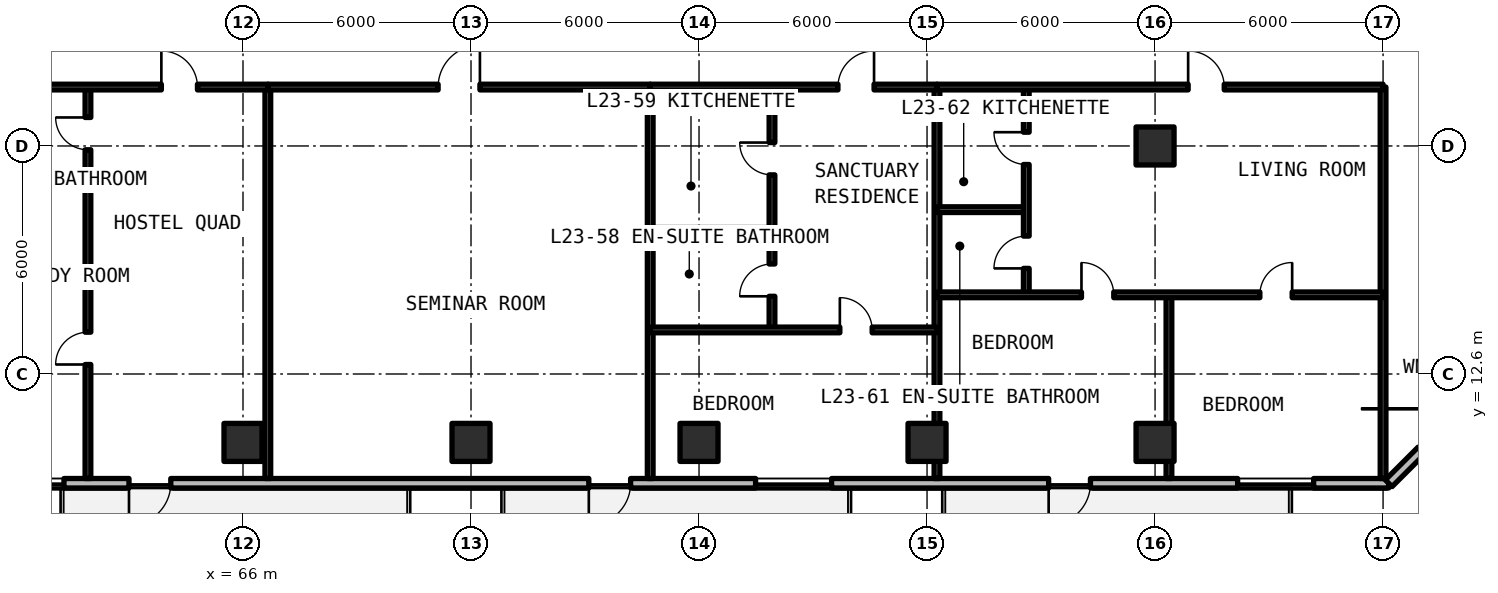
"""IFC4 building model, lengths in metres.
Left out: names, types, materials, properties, quantities, classifications, styles, units other than length and angle.
Written with IfcOpenShell. Run it as: python <this file> out.ifc"""

import sys

from ifc_helpers import new_model, si_unit, direction, frame, frame_2d, origin, origin_2d, place, context, subcontext, project, spatial, rectangle, extrude, element, fill, save


model = new_model("IFC4")
c1 = context("Model", 3, precision=1e-05, world=origin(), true_north=direction((0.0, 1.0)))
c2 = subcontext(c1, "Body", "Model", "MODEL_VIEW")
j1 = project(units=[si_unit("LENGTHUNIT", "METRE"), si_unit("PLANEANGLEUNIT", "RADIAN")], contexts=[c1])
p1 = place(None, origin())
s1 = spatial("IfcSite", under=j1, at=p1, CompositionType="ELEMENT")
p2 = place(p1, origin())
s2 = spatial("IfcBuilding", under=s1, at=p2, CompositionType="ELEMENT")
p3 = place(p2, frame((0.0, 0.0, 85.47)))
s3 = spatial("IfcBuildingStorey", under=s2, at=p3, CompositionType="ELEMENT", Elevation=85.47)
for number, where, z_axis, x_axis in (
    (1, (90.0, 18.6, 0.0), (0.0, 0.0, 1.0), (1.0, 0.0, 0.0)),
    (2, (66.0, 10.8, 0.0), (0.0, 0.0, 1.0), (1.0, 0.0, 0.0)),
    (3, (72.0, 10.8, 0.0), (0.0, 0.0, 1.0), (1.0, 0.0, 0.0)),
    (4, (78.0, 10.8, 0.0), (0.0, 0.0, 1.0), (1.0, 0.0, 0.0)),
    (5, (84.0, 10.8, 0.0), (0.0, 0.0, 1.0), (1.0, 0.0, 0.0)),
    (6, (90.0, 10.8, 0.0), (0.0, 0.0, 1.0), (1.0, 0.0, 0.0)),
):
    element("IfcColumn", number, at=place(p3, frame(where, z_axis=z_axis, x_axis=x_axis)), inside=s3, PredefinedType="COLUMN", context=c2, shape_type="SweptSolid", body=[
        extrude(rectangle(XDim=1.0, YDim=1.0, at=origin_2d()), origin(), (0.0, 0.0, 1.0), 3.3),
    ])
p4 = place(p3, frame((52.125, 9.725, 0.0), z_axis=(0.0, 0.0, 1.0), x_axis=(1.0, 0.0, 0.0)))
e7 = element("IfcWall", 7, at=p4, inside=s3, PredefinedType="SOLIDWALL", context=c2, shape_type="SweptSolid", body=[
    extrude(rectangle(XDim=44.023, YDim=0.25, at=frame_2d((22.012, 0.0))), origin(), (0.0, 0.0, 1.0), 3.08),
])
p5 = place(p4, frame((10.875, 0.0, 0.0)))
e8 = element("IfcOpeningElement", 8, at=p5, cuts=e7, PredefinedType="OPENING", context=c2, shape_type="SweptSolid", body=[
    extrude(rectangle(XDim=1.1, YDim=2.15, at=frame_2d((0.55, 1.075))), frame((0.0, 0.135, 0.0), z_axis=(0.0, -1.0, 0.0), x_axis=(1.0, 0.0, 0.0)), (0.0, 0.0, 1.0), 0.27),
])
p6 = place(p4, frame((22.975, 0.0, 0.0)))
e9 = element("IfcOpeningElement", 9, at=p6, cuts=e7, PredefinedType="OPENING", context=c2, shape_type="SweptSolid", body=[
    extrude(rectangle(XDim=1.1, YDim=2.15, at=frame_2d((0.55, 1.075))), frame((0.0, 0.135, 0.0), z_axis=(0.0, -1.0, 0.0), x_axis=(1.0, 0.0, 0.0)), (0.0, 0.0, 1.0), 0.27),
])
p7 = place(p4, frame((35.075, 0.0, 0.0)))
e10 = element("IfcOpeningElement", 10, at=p7, cuts=e7, PredefinedType="OPENING", context=c2, shape_type="SweptSolid", body=[
    extrude(rectangle(XDim=1.1, YDim=2.15, at=frame_2d((0.55, 1.075))), frame((0.0, 0.135, 0.0), z_axis=(0.0, -1.0, 0.0), x_axis=(1.0, 0.0, 0.0)), (0.0, 0.0, 1.0), 0.27),
])
p8 = place(p4, frame((2.669, 0.0, 0.78)))
e11 = element("IfcOpeningElement", 11, at=p8, cuts=e7, PredefinedType="OPENING", context=c2, shape_type="SweptSolid", body=[
    extrude(rectangle(XDim=2.0, YDim=1.66, at=frame_2d((1.0, 0.83))), frame((0.0, 0.135, 0.0), z_axis=(0.0, -1.0, 0.0), x_axis=(1.0, 0.0, 0.0)), (0.0, 0.0, 1.0), 0.27),
])
p9 = place(p4, frame((8.314, 0.0, 0.78)))
e12 = element("IfcOpeningElement", 12, at=p9, cuts=e7, PredefinedType="OPENING", context=c2, shape_type="SweptSolid", body=[
    extrude(rectangle(XDim=0.85, YDim=1.65, at=frame_2d((0.425, 0.825))), frame((0.0, 0.135, 0.0), z_axis=(0.0, -1.0, 0.0), x_axis=(1.0, 0.0, 0.0)), (0.0, 0.0, 1.0), 0.27),
])
p10 = place(p4, frame((27.363, 0.0, 0.78)))
e13 = element("IfcOpeningElement", 13, at=p10, cuts=e7, PredefinedType="OPENING", context=c2, shape_type="SweptSolid", body=[
    extrude(rectangle(XDim=2.0, YDim=1.66, at=frame_2d((1.0, 0.83))), frame((0.0, 0.135, 0.0), z_axis=(0.0, -1.0, 0.0), x_axis=(1.0, 0.0, 0.0)), (0.0, 0.0, 1.0), 0.27),
])
p11 = place(p4, frame((40.048, 0.0, 0.78)))
e14 = element("IfcOpeningElement", 14, at=p11, cuts=e7, PredefinedType="OPENING", context=c2, shape_type="SweptSolid", body=[
    extrude(rectangle(XDim=2.0, YDim=1.66, at=frame_2d((1.0, 0.83))), frame((0.0, 0.135, 0.0), z_axis=(0.0, -1.0, 0.0), x_axis=(1.0, 0.0, 0.0)), (0.0, 0.0, 1.0), 0.27),
])
p12 = place(p3, frame((96.148, 9.725, 0.0), z_axis=(0.0, 0.0, 1.0), x_axis=(0.707106781187, 0.707106781187, 0.0)))
e15 = element("IfcWall", 15, at=p12, inside=s3, PredefinedType="SOLIDWALL", context=c2, shape_type="SweptSolid", body=[
    extrude(rectangle(XDim=5.836, YDim=0.25, at=frame_2d((2.918, 0.0))), origin(), (0.0, 0.0, 1.0), 3.08),
])
p13 = place(p12, frame((1.218, 0.0, 0.78)))
e16 = element("IfcOpeningElement", 16, at=p13, cuts=e15, PredefinedType="OPENING", context=c2, shape_type="SweptSolid", body=[
    extrude(rectangle(XDim=3.4, YDim=1.66, at=frame_2d((1.7, 0.83))), frame((0.0, 0.135, 0.0), z_axis=(0.0, -1.0, 0.0), x_axis=(1.0, 0.0, 0.0)), (0.0, 0.0, 1.0), 0.27),
])
for number, where, z_axis, x_axis in (
    (17, (96.0, 9.85, 0.0), (0.0, 0.0, 1.0), (0.0, 1.0, 0.0)),
    (18, (66.654, 9.85, 0.0), (0.0, 0.0, 1.0), (0.0, 1.0, 0.0)),
):
    element("IfcWall", number, at=place(p3, frame(where, z_axis=z_axis, x_axis=x_axis)), inside=s3, PredefinedType="SOLIDWALL", context=c2, shape_type="SweptSolid", body=[
        extrude(rectangle(XDim=10.3, YDim=0.15, at=frame_2d((5.15, 0.0))), origin(), (0.0, 0.0, 1.0), 2.35),
    ])
p14 = place(p3, frame((58.828, 17.7, 0.0), z_axis=(0.0, 0.0, 1.0), x_axis=(1.0, 0.0, 0.0)))
e19 = element("IfcWall", 19, at=p14, inside=s3, PredefinedType="PARTITIONING", context=c2, shape_type="SweptSolid", body=[
    extrude(rectangle(XDim=3.092, YDim=0.15, at=frame_2d((1.546, 0.0))), origin(), (0.0, 0.0, 1.0), 2.35),
])
p15 = place(p3, frame((61.92, 9.85, 0.0), z_axis=(0.0, 0.0, 1.0), x_axis=(0.0, 1.0, 0.0)))
e20 = element("IfcWall", 20, at=p15, inside=s3, PredefinedType="PARTITIONING", context=c2, shape_type="SweptSolid", body=[
    extrude(rectangle(XDim=10.3, YDim=0.15, at=frame_2d((5.15, 0.0))), origin(), (0.0, 0.0, 1.0), 2.35),
])
p16 = place(p15, frame((3.0, 0.0, 0.0)))
e21 = element("IfcOpeningElement", 21, at=p16, cuts=e20, PredefinedType="OPENING", context=c2, shape_type="SweptSolid", body=[
    extrude(rectangle(XDim=0.85, YDim=2.1, at=frame_2d((0.425, 1.05))), frame((0.0, 0.085, 0.0), z_axis=(0.0, -1.0, 0.0), x_axis=(1.0, 0.0, 0.0)), (0.0, 0.0, 1.0), 0.17),
])
p17 = place(p15, frame((8.65, 0.0, 0.0)))
e22 = element("IfcOpeningElement", 22, at=p17, cuts=e20, PredefinedType="OPENING", context=c2, shape_type="SweptSolid", body=[
    extrude(rectangle(XDim=0.85, YDim=2.1, at=frame_2d((0.425, 1.05))), frame((0.0, 0.085, 0.0), z_axis=(0.0, -1.0, 0.0), x_axis=(1.0, 0.0, 0.0)), (0.0, 0.0, 1.0), 0.17),
])
p18 = place(p3, frame((58.828, 20.15, 0.0), z_axis=(0.0, 0.0, 1.0), x_axis=(1.0, 0.0, 0.0)))
e23 = element("IfcWall", 23, at=p18, inside=s3, PredefinedType="SOLIDWALL", context=c2, shape_type="SweptSolid", body=[
    extrude(rectangle(XDim=7.826, YDim=0.15, at=frame_2d((3.913, 0.0))), origin(), (0.0, 0.0, 1.0), 2.35),
])
p19 = place(p18, frame((5.024, 0.0, 0.0)))
e24 = element("IfcOpeningElement", 24, at=p19, cuts=e23, PredefinedType="OPENING", context=c2, shape_type="SweptSolid", body=[
    extrude(rectangle(XDim=0.95, YDim=2.15, at=frame_2d((0.475, 1.075))), frame((0.0, 0.085, 0.0), z_axis=(0.0, -1.0, 0.0), x_axis=(1.0, 0.0, 0.0)), (0.0, 0.0, 1.0), 0.17),
])
p20 = place(p3, frame((76.715, 9.85, 0.0), z_axis=(0.0, 0.0, 1.0), x_axis=(0.0, 1.0, 0.0)))
e25 = element("IfcWall", 25, at=p20, inside=s3, PredefinedType="SOLIDWALL", context=c2, shape_type="SweptSolid", body=[
    extrude(rectangle(XDim=10.3, YDim=0.15, at=frame_2d((5.15, 0.0))), origin(), (0.0, 0.0, 1.0), 2.35),
])
p21 = place(p3, frame((66.654, 20.15, 0.0), z_axis=(0.0, 0.0, 1.0), x_axis=(1.0, 0.0, 0.0)))
e26 = element("IfcWall", 26, at=p21, inside=s3, PredefinedType="SOLIDWALL", context=c2, shape_type="SweptSolid", body=[
    extrude(rectangle(XDim=10.062, YDim=0.15, at=frame_2d((5.031, 0.0))), origin(), (0.0, 0.0, 1.0), 2.35),
])
p22 = place(p21, frame((4.481, 0.0, 0.0)))
e27 = element("IfcOpeningElement", 27, at=p22, cuts=e26, PredefinedType="OPENING", context=c2, shape_type="SweptSolid", body=[
    extrude(rectangle(XDim=1.1, YDim=2.15, at=frame_2d((0.55, 1.075))), frame((0.0, 0.085, 0.0), z_axis=(0.0, -1.0, 0.0), x_axis=(1.0, 0.0, 0.0)), (0.0, 0.0, 1.0), 0.17),
])
p23 = place(p3, frame((84.261, 9.85, 0.0), z_axis=(0.0, 0.0, 1.0), x_axis=(0.0, 1.0, 0.0)))
e28 = element("IfcWall", 28, at=p23, inside=s3, PredefinedType="SOLIDWALL", context=c2, shape_type="SweptSolid", body=[
    extrude(rectangle(XDim=10.3, YDim=0.15, at=frame_2d((5.15, 0.0))), origin(), (0.0, 0.0, 1.0), 2.35),
])
p24 = place(p3, frame((76.715, 16.379, 0.0), z_axis=(0.0, 0.0, 1.0), x_axis=(1.0, 0.0, 0.0)))
e29 = element("IfcWall", 29, at=p24, inside=s3, PredefinedType="PARTITIONING", context=c2, shape_type="SweptSolid", body=[
    extrude(rectangle(XDim=3.205, YDim=0.15, at=frame_2d((1.603, 0.0))), origin(), (0.0, 0.0, 1.0), 2.35),
])
p25 = place(p3, frame((79.92, 13.759, 0.0), z_axis=(0.0, 0.0, 1.0), x_axis=(0.0, 1.0, 0.0)))
e30 = element("IfcWall", 30, at=p25, inside=s3, PredefinedType="PARTITIONING", context=c2, shape_type="SweptSolid", body=[
    extrude(rectangle(XDim=6.391, YDim=0.15, at=frame_2d((3.195, 0.0))), origin(), (0.0, 0.0, 1.0), 2.35),
])
p26 = place(p25, frame((0.885, 0.0, 0.0)))
e31 = element("IfcOpeningElement", 31, at=p26, cuts=e30, PredefinedType="OPENING", context=c2, shape_type="SweptSolid", body=[
    extrude(rectangle(XDim=0.85, YDim=2.1, at=frame_2d((0.425, 1.05))), frame((0.0, 0.085, 0.0), z_axis=(0.0, -1.0, 0.0), x_axis=(1.0, 0.0, 0.0)), (0.0, 0.0, 1.0), 0.17),
])
p27 = place(p25, frame((4.08, 0.0, 0.0)))
e32 = element("IfcOpeningElement", 32, at=p27, cuts=e30, PredefinedType="OPENING", context=c2, shape_type="SweptSolid", body=[
    extrude(rectangle(XDim=0.85, YDim=2.1, at=frame_2d((0.425, 1.05))), frame((0.0, 0.085, 0.0), z_axis=(0.0, -1.0, 0.0), x_axis=(1.0, 0.0, 0.0)), (0.0, 0.0, 1.0), 0.17),
])
p28 = place(p3, frame((76.715, 13.759, 0.0), z_axis=(0.0, 0.0, 1.0), x_axis=(1.0, 0.0, 0.0)))
e33 = element("IfcWall", 33, at=p28, inside=s3, PredefinedType="PARTITIONING", context=c2, shape_type="SweptSolid", body=[
    extrude(rectangle(XDim=7.546, YDim=0.15, at=frame_2d((3.773, 0.0))), origin(), (0.0, 0.0, 1.0), 2.35),
])
p29 = place(p28, frame((4.99, 0.0, 0.0)))
e34 = element("IfcOpeningElement", 34, at=p29, cuts=e33, PredefinedType="OPENING", context=c2, shape_type="SweptSolid", body=[
    extrude(rectangle(XDim=0.85, YDim=2.1, at=frame_2d((0.425, 1.05))), frame((0.0, 0.085, 0.0), z_axis=(0.0, -1.0, 0.0), x_axis=(1.0, 0.0, 0.0)), (0.0, 0.0, 1.0), 0.17),
])
p30 = place(p3, frame((76.715, 20.15, 0.0), z_axis=(0.0, 0.0, 1.0), x_axis=(1.0, 0.0, 0.0)))
e35 = element("IfcWall", 35, at=p30, inside=s3, PredefinedType="SOLIDWALL", context=c2, shape_type="SweptSolid", body=[
    extrude(rectangle(XDim=7.546, YDim=0.15, at=frame_2d((3.773, 0.0))), origin(), (0.0, 0.0, 1.0), 2.35),
])
p31 = place(p30, frame((4.94, 0.0, 0.0)))
e36 = element("IfcOpeningElement", 36, at=p31, cuts=e35, PredefinedType="OPENING", context=c2, shape_type="SweptSolid", body=[
    extrude(rectangle(XDim=0.95, YDim=2.15, at=frame_2d((0.475, 1.075))), frame((0.0, 0.085, 0.0), z_axis=(0.0, -1.0, 0.0), x_axis=(1.0, 0.0, 0.0)), (0.0, 0.0, 1.0), 0.17),
])
p32 = place(p3, frame((84.261, 16.924, 0.0), z_axis=(0.0, 0.0, 1.0), x_axis=(1.0, 0.0, 0.0)))
e37 = element("IfcWall", 37, at=p32, inside=s3, PredefinedType="PARTITIONING", context=c2, shape_type="SweptSolid", body=[
    extrude(rectangle(XDim=2.35, YDim=0.15, at=frame_2d((1.175, 0.0))), origin(), (0.0, 0.0, 1.0), 2.35),
])
p33 = place(p3, frame((86.611, 14.683, 0.0), z_axis=(0.0, 0.0, 1.0), x_axis=(0.0, 1.0, 0.0)))
e38 = element("IfcWall", 38, at=p33, inside=s3, PredefinedType="PARTITIONING", context=c2, shape_type="SweptSolid", body=[
    extrude(rectangle(XDim=5.467, YDim=0.15, at=frame_2d((2.733, 0.0))), origin(), (0.0, 0.0, 1.0), 2.35),
])
p34 = place(p33, frame((0.696, 0.0, 0.0)))
e39 = element("IfcOpeningElement", 39, at=p34, cuts=e38, PredefinedType="OPENING", context=c2, shape_type="SweptSolid", body=[
    extrude(rectangle(XDim=0.85, YDim=2.1, at=frame_2d((0.425, 1.05))), frame((0.0, 0.085, 0.0), z_axis=(0.0, -1.0, 0.0), x_axis=(1.0, 0.0, 0.0)), (0.0, 0.0, 1.0), 0.17),
])
p35 = place(p33, frame((3.429, 0.0, 0.0)))
e40 = element("IfcOpeningElement", 40, at=p35, cuts=e38, PredefinedType="OPENING", context=c2, shape_type="SweptSolid", body=[
    extrude(rectangle(XDim=0.85, YDim=2.1, at=frame_2d((0.425, 1.05))), frame((0.0, 0.085, 0.0), z_axis=(0.0, -1.0, 0.0), x_axis=(1.0, 0.0, 0.0)), (0.0, 0.0, 1.0), 0.17),
])
p36 = place(p3, frame((90.365, 9.85, 0.0), z_axis=(0.0, 0.0, 1.0), x_axis=(0.0, 1.0, 0.0)))
e41 = element("IfcWall", 41, at=p36, inside=s3, PredefinedType="PARTITIONING", context=c2, shape_type="SweptSolid", body=[
    extrude(rectangle(XDim=4.833, YDim=0.15, at=frame_2d((2.417, 0.0))), origin(), (0.0, 0.0, 1.0), 2.35),
])
p37 = place(p3, frame((84.261, 14.683, 0.0), z_axis=(0.0, 0.0, 1.0), x_axis=(1.0, 0.0, 0.0)))
e42 = element("IfcWall", 42, at=p37, inside=s3, PredefinedType="PARTITIONING", context=c2, shape_type="SweptSolid", body=[
    extrude(rectangle(XDim=11.739, YDim=0.15, at=frame_2d((5.869, 0.0))), origin(), (0.0, 0.0, 1.0), 2.35),
])
p38 = place(p37, frame((3.802, 0.0, 0.0)))
e43 = element("IfcOpeningElement", 43, at=p38, cuts=e42, PredefinedType="OPENING", context=c2, shape_type="SweptSolid", body=[
    extrude(rectangle(XDim=0.85, YDim=2.1, at=frame_2d((0.425, 1.05))), frame((0.0, 0.085, 0.0), z_axis=(0.0, -1.0, 0.0), x_axis=(1.0, 0.0, 0.0)), (0.0, 0.0, 1.0), 0.17),
])
p39 = place(p37, frame((8.496, 0.0, 0.0)))
e44 = element("IfcOpeningElement", 44, at=p39, cuts=e42, PredefinedType="OPENING", context=c2, shape_type="SweptSolid", body=[
    extrude(rectangle(XDim=0.85, YDim=2.1, at=frame_2d((0.425, 1.05))), frame((0.0, 0.085, 0.0), z_axis=(0.0, -1.0, 0.0), x_axis=(1.0, 0.0, 0.0)), (0.0, 0.0, 1.0), 0.17),
])
p40 = place(p3, frame((84.261, 20.15, 0.0), z_axis=(0.0, 0.0, 1.0), x_axis=(1.0, 0.0, 0.0)))
e45 = element("IfcWall", 45, at=p40, inside=s3, PredefinedType="SOLIDWALL", context=c2, shape_type="SweptSolid", body=[
    extrude(rectangle(XDim=11.739, YDim=0.15, at=frame_2d((5.869, 0.0))), origin(), (0.0, 0.0, 1.0), 2.35),
])
p41 = place(p40, frame((6.609, 0.0, 0.0)))
e46 = element("IfcOpeningElement", 46, at=p41, cuts=e45, PredefinedType="OPENING", context=c2, shape_type="SweptSolid", body=[
    extrude(rectangle(XDim=0.95, YDim=2.15, at=frame_2d((0.475, 1.075))), frame((0.0, 0.085, 0.0), z_axis=(0.0, -1.0, 0.0), x_axis=(1.0, 0.0, 0.0)), (0.0, 0.0, 1.0), 0.17),
])
p42 = place(p5, frame((1.1, 0.0, 0.0), z_axis=(0.0, 0.0, 1.0), x_axis=(-1.0, 0.0, 0.0)))
e47 = element("IfcDoor", 47, at=p42, inside=s3, OperationType="SINGLE_SWING_LEFT", PredefinedType="DOOR", context=c2, shape_type="SweptSolid", body=[
    extrude(rectangle(XDim=1.1, YDim=2.15, at=frame_2d((0.55, 1.075))), frame((0.0, 0.025, 0.0), z_axis=(0.0, -1.0, 0.0), x_axis=(1.0, 0.0, 0.0)), (0.0, 0.0, 1.0), 0.05),
])
fill(e8, e47)
p43 = place(p6, frame((1.1, 0.0, 0.0), z_axis=(0.0, 0.0, 1.0), x_axis=(-1.0, 0.0, 0.0)))
e48 = element("IfcDoor", 48, at=p43, inside=s3, OperationType="SINGLE_SWING_RIGHT", PredefinedType="DOOR", context=c2, shape_type="SweptSolid", body=[
    extrude(rectangle(XDim=1.1, YDim=2.15, at=frame_2d((0.55, 1.075))), frame((0.0, 0.025, 0.0), z_axis=(0.0, -1.0, 0.0), x_axis=(1.0, 0.0, 0.0)), (0.0, 0.0, 1.0), 0.05),
])
fill(e9, e48)
p44 = place(p7, frame((1.1, 0.0, 0.0), z_axis=(0.0, 0.0, 1.0), x_axis=(-1.0, 0.0, 0.0)))
e49 = element("IfcDoor", 49, at=p44, inside=s3, OperationType="SINGLE_SWING_LEFT", PredefinedType="DOOR", context=c2, shape_type="SweptSolid", body=[
    extrude(rectangle(XDim=1.1, YDim=2.15, at=frame_2d((0.55, 1.075))), frame((0.0, 0.025, 0.0), z_axis=(0.0, -1.0, 0.0), x_axis=(1.0, 0.0, 0.0)), (0.0, 0.0, 1.0), 0.05),
])
fill(e10, e49)
p45 = place(p9, origin())
e50 = element("IfcWindow", 50, at=p45, inside=s3, PartitioningType="SINGLE_PANEL", PredefinedType="WINDOW", context=c2, shape_type="SweptSolid", body=[
    extrude(rectangle(XDim=0.85, YDim=1.65, at=frame_2d((0.425, 0.825))), frame((0.0, 0.03, 0.0), z_axis=(0.0, -1.0, 0.0), x_axis=(1.0, 0.0, 0.0)), (0.0, 0.0, 1.0), 0.06),
])
fill(e12, e50)
p46 = place(p10, origin())
e51 = element("IfcWindow", 51, at=p46, inside=s3, PartitioningType="SINGLE_PANEL", PredefinedType="WINDOW", context=c2, shape_type="SweptSolid", body=[
    extrude(rectangle(XDim=2.0, YDim=1.66, at=frame_2d((1.0, 0.83))), frame((0.0, 0.03, 0.0), z_axis=(0.0, -1.0, 0.0), x_axis=(1.0, 0.0, 0.0)), (0.0, 0.0, 1.0), 0.06),
])
fill(e13, e51)
p47 = place(p11, origin())
e52 = element("IfcWindow", 52, at=p47, inside=s3, PartitioningType="SINGLE_PANEL", PredefinedType="WINDOW", context=c2, shape_type="SweptSolid", body=[
    extrude(rectangle(XDim=2.0, YDim=1.66, at=frame_2d((1.0, 0.83))), frame((0.0, 0.03, 0.0), z_axis=(0.0, -1.0, 0.0), x_axis=(1.0, 0.0, 0.0)), (0.0, 0.0, 1.0), 0.06),
])
fill(e14, e52)
p48 = place(p16, origin())
e53 = element("IfcDoor", 53, at=p48, inside=s3, OperationType="SINGLE_SWING_LEFT", PredefinedType="DOOR", context=c2, shape_type="SweptSolid", body=[
    extrude(rectangle(XDim=0.85, YDim=2.1, at=frame_2d((0.425, 1.05))), frame((0.0, 0.025, 0.0), z_axis=(0.0, -1.0, 0.0), x_axis=(1.0, 0.0, 0.0)), (0.0, 0.0, 1.0), 0.05),
])
fill(e21, e53)
p49 = place(p17, origin())
e54 = element("IfcDoor", 54, at=p49, inside=s3, OperationType="SINGLE_SWING_RIGHT", PredefinedType="DOOR", context=c2, shape_type="SweptSolid", body=[
    extrude(rectangle(XDim=0.85, YDim=2.1, at=frame_2d((0.425, 1.05))), frame((0.0, 0.025, 0.0), z_axis=(0.0, -1.0, 0.0), x_axis=(1.0, 0.0, 0.0)), (0.0, 0.0, 1.0), 0.05),
])
fill(e22, e54)
p50 = place(p19, origin())
e55 = element("IfcDoor", 55, at=p50, inside=s3, OperationType="SINGLE_SWING_LEFT", PredefinedType="DOOR", context=c2, shape_type="SweptSolid", body=[
    extrude(rectangle(XDim=0.95, YDim=2.15, at=frame_2d((0.475, 1.075))), frame((0.0, 0.025, 0.0), z_axis=(0.0, -1.0, 0.0), x_axis=(1.0, 0.0, 0.0)), (0.0, 0.0, 1.0), 0.05),
])
fill(e24, e55)
p51 = place(p22, origin())
e56 = element("IfcDoor", 56, at=p51, inside=s3, OperationType="SINGLE_SWING_RIGHT", PredefinedType="DOOR", context=c2, shape_type="SweptSolid", body=[
    extrude(rectangle(XDim=1.1, YDim=2.15, at=frame_2d((0.55, 1.075))), frame((0.0, 0.025, 0.0), z_axis=(0.0, -1.0, 0.0), x_axis=(1.0, 0.0, 0.0)), (0.0, 0.0, 1.0), 0.05),
])
fill(e27, e56)
p52 = place(p26, origin())
e57 = element("IfcDoor", 57, at=p52, inside=s3, OperationType="SINGLE_SWING_LEFT", PredefinedType="DOOR", context=c2, shape_type="SweptSolid", body=[
    extrude(rectangle(XDim=0.85, YDim=2.1, at=frame_2d((0.425, 1.05))), frame((0.0, 0.025, 0.0), z_axis=(0.0, -1.0, 0.0), x_axis=(1.0, 0.0, 0.0)), (0.0, 0.0, 1.0), 0.05),
])
fill(e31, e57)
p53 = place(p27, origin())
e58 = element("IfcDoor", 58, at=p53, inside=s3, OperationType="SINGLE_SWING_RIGHT", PredefinedType="DOOR", context=c2, shape_type="SweptSolid", body=[
    extrude(rectangle(XDim=0.85, YDim=2.1, at=frame_2d((0.425, 1.05))), frame((0.0, 0.025, 0.0), z_axis=(0.0, -1.0, 0.0), x_axis=(1.0, 0.0, 0.0)), (0.0, 0.0, 1.0), 0.05),
])
fill(e32, e58)
p54 = place(p29, origin())
e59 = element("IfcDoor", 59, at=p54, inside=s3, OperationType="SINGLE_SWING_LEFT", PredefinedType="DOOR", context=c2, shape_type="SweptSolid", body=[
    extrude(rectangle(XDim=0.85, YDim=2.1, at=frame_2d((0.425, 1.05))), frame((0.0, 0.025, 0.0), z_axis=(0.0, -1.0, 0.0), x_axis=(1.0, 0.0, 0.0)), (0.0, 0.0, 1.0), 0.05),
])
fill(e34, e59)
p55 = place(p31, origin())
e60 = element("IfcDoor", 60, at=p55, inside=s3, OperationType="SINGLE_SWING_RIGHT", PredefinedType="DOOR", context=c2, shape_type="SweptSolid", body=[
    extrude(rectangle(XDim=0.95, YDim=2.15, at=frame_2d((0.475, 1.075))), frame((0.0, 0.025, 0.0), z_axis=(0.0, -1.0, 0.0), x_axis=(1.0, 0.0, 0.0)), (0.0, 0.0, 1.0), 0.05),
])
fill(e36, e60)
p56 = place(p34, origin())
e61 = element("IfcDoor", 61, at=p56, inside=s3, OperationType="SINGLE_SWING_LEFT", PredefinedType="DOOR", context=c2, shape_type="SweptSolid", body=[
    extrude(rectangle(XDim=0.85, YDim=2.1, at=frame_2d((0.425, 1.05))), frame((0.0, 0.025, 0.0), z_axis=(0.0, -1.0, 0.0), x_axis=(1.0, 0.0, 0.0)), (0.0, 0.0, 1.0), 0.05),
])
fill(e39, e61)
p57 = place(p35, origin())
e62 = element("IfcDoor", 62, at=p57, inside=s3, OperationType="SINGLE_SWING_RIGHT", PredefinedType="DOOR", context=c2, shape_type="SweptSolid", body=[
    extrude(rectangle(XDim=0.85, YDim=2.1, at=frame_2d((0.425, 1.05))), frame((0.0, 0.025, 0.0), z_axis=(0.0, -1.0, 0.0), x_axis=(1.0, 0.0, 0.0)), (0.0, 0.0, 1.0), 0.05),
])
fill(e40, e62)
p58 = place(p38, origin())
e63 = element("IfcDoor", 63, at=p58, inside=s3, OperationType="SINGLE_SWING_LEFT", PredefinedType="DOOR", context=c2, shape_type="SweptSolid", body=[
    extrude(rectangle(XDim=0.85, YDim=2.1, at=frame_2d((0.425, 1.05))), frame((0.0, 0.025, 0.0), z_axis=(0.0, -1.0, 0.0), x_axis=(1.0, 0.0, 0.0)), (0.0, 0.0, 1.0), 0.05),
])
fill(e43, e63)
p59 = place(p39, origin())
e64 = element("IfcDoor", 64, at=p59, inside=s3, OperationType="SINGLE_SWING_RIGHT", PredefinedType="DOOR", context=c2, shape_type="SweptSolid", body=[
    extrude(rectangle(XDim=0.85, YDim=2.1, at=frame_2d((0.425, 1.05))), frame((0.0, 0.025, 0.0), z_axis=(0.0, -1.0, 0.0), x_axis=(1.0, 0.0, 0.0)), (0.0, 0.0, 1.0), 0.05),
])
fill(e44, e64)
p60 = place(p41, origin())
e65 = element("IfcDoor", 65, at=p60, inside=s3, OperationType="SINGLE_SWING_LEFT", PredefinedType="DOOR", context=c2, shape_type="SweptSolid", body=[
    extrude(rectangle(XDim=0.95, YDim=2.15, at=frame_2d((0.475, 1.075))), frame((0.0, 0.025, 0.0), z_axis=(0.0, -1.0, 0.0), x_axis=(1.0, 0.0, 0.0)), (0.0, 0.0, 1.0), 0.05),
])
fill(e46, e65)
save(model, sys.argv[1])
